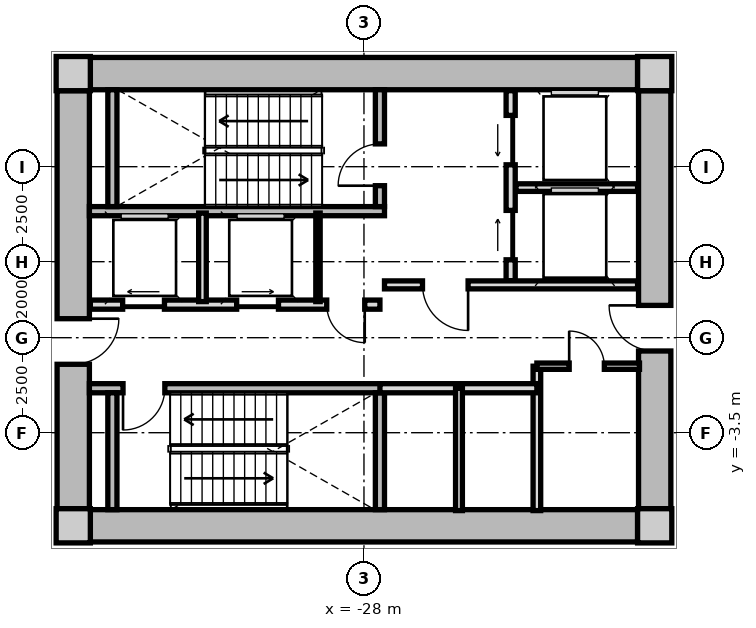
"""IFC4 building model, lengths in metres.
Left out: names, types, materials, properties, quantities, classifications, styles, units other than length and angle.
Written with IfcOpenShell. Run it as: python <this file> out.ifc"""

import sys

from ifc_helpers import new_model, si_unit, direction, frame, frame_2d, origin, origin_2d, place, context, subcontext, project, spatial, rectangle, extrude, source, transform, mapped, element, fill, save


model = new_model("IFC4")
c1 = context("Model", 3, precision=1e-05, world=origin(), true_north=direction((0.0, 1.0)))
c2 = subcontext(c1, "Body", "Model", "MODEL_VIEW")
j1 = project(units=[si_unit("LENGTHUNIT", "METRE"), si_unit("PLANEANGLEUNIT", "RADIAN")], contexts=[c1])
p1 = place(None, origin())
s1 = spatial("IfcSite", under=j1, at=p1, CompositionType="ELEMENT")
p2 = place(p1, origin())
s2 = spatial("IfcBuilding", under=s1, at=p2, CompositionType="ELEMENT")
p3 = place(p2, frame((0.0, 0.0, 4.2)))
s3 = spatial("IfcBuildingStorey", under=s2, at=p3, CompositionType="ELEMENT", Elevation=4.2)
m1 = source(origin(), c2, "Body", "SweptSolid", [
    extrude(rectangle(XDim=0.9, YDim=0.9, at=origin_2d()), origin(), (0.0, 0.0, 1.0), 4.2),
])
for number, where, z_axis, x_axis in (
    (1, (-35.65, -5.95, 0.0), (0.0, 0.0, 1.0), (1.0, 0.0, 0.0)),
    (2, (-20.35, -5.95, 0.0), (0.0, 0.0, 1.0), (1.0, 0.0, 0.0)),
    (3, (-20.35, 5.95, 0.0), (0.0, 0.0, 1.0), (1.0, 0.0, 0.0)),
    (4, (-35.65, 5.95, 0.0), (0.0, 0.0, 1.0), (1.0, 0.0, 0.0)),
):
    element("IfcColumn", number, at=place(p3, frame(where, z_axis=z_axis, x_axis=x_axis)), inside=s3, PredefinedType="COLUMN", context=c2, shape_type="MappedRepresentation", body=[
        mapped(m1, transform((0.0, 0.0, 0.0), x_axis=(1.0, 0.0, 0.0), y_axis=(0.0, 1.0, 0.0), z_axis=(0.0, 0.0, 1.0), scale=1.0)),
    ])
m2 = source(origin(), c2, "Body", "SweptSolid", [
    extrude(rectangle(XDim=14.4, YDim=0.85, at=frame_2d((7.2, 0.0))), origin(), (0.0, 0.0, 1.0), 3.88),
])
for number, where, z_axis, x_axis in (
    (5, (-35.2, 5.95, 0.0), (0.0, 0.0, 1.0), (1.0, 0.0, 0.0)),
    (6, (-20.8, -5.95, 0.0), (0.0, 0.0, 1.0), (-1.0, 0.0, 0.0)),
):
    element("IfcWall", number, at=place(p3, frame(where, z_axis=z_axis, x_axis=x_axis)), inside=s3, PredefinedType="SHEAR", context=c2, shape_type="MappedRepresentation", body=[
        mapped(m2, transform((0.0, 0.0, 0.0), x_axis=(1.0, 0.0, 0.0), y_axis=(0.0, 1.0, 0.0), z_axis=(0.0, 0.0, 1.0), scale=1.0)),
    ])
m3 = source(origin(), c2, "Body", "SweptSolid", [
    extrude(rectangle(XDim=11.0, YDim=0.85, at=frame_2d((5.5, 0.0))), origin(), (0.0, 0.0, 1.0), 3.88),
])
p4 = place(p3, frame((-35.65, -5.5, 0.0), z_axis=(0.0, 0.0, 1.0), x_axis=(0.0, 1.0, 0.0)))
e7 = element("IfcWall", 7, at=p4, inside=s3, PredefinedType="SHEAR", context=c2, shape_type="MappedRepresentation", body=[
    mapped(m3, transform((0.0, 0.0, 0.0), x_axis=(1.0, 0.0, 0.0), y_axis=(0.0, 1.0, 0.0), z_axis=(0.0, 0.0, 1.0), scale=1.0)),
])
p5 = place(p4, frame((3.8, 0.0, 0.0)))
e8 = element("IfcOpeningElement", 8, at=p5, cuts=e7, PredefinedType="OPENING", context=c2, shape_type="SweptSolid", body=[
    extrude(rectangle(XDim=1.2, YDim=2.15, at=frame_2d((0.6, 1.075))), frame((0.0, 0.435, 0.0), z_axis=(0.0, -1.0, 0.0), x_axis=(1.0, 0.0, 0.0)), (0.0, 0.0, 1.0), 0.87),
])
p6 = place(p3, frame((-20.35, 5.5, 0.0), z_axis=(0.0, 0.0, 1.0), x_axis=(0.0, -1.0, 0.0)))
e9 = element("IfcWall", 9, at=p6, inside=s3, PredefinedType="SHEAR", context=c2, shape_type="MappedRepresentation", body=[
    mapped(m3, transform((0.0, 0.0, 0.0), x_axis=(1.0, 0.0, 0.0), y_axis=(0.0, 1.0, 0.0), z_axis=(0.0, 0.0, 1.0), scale=1.0)),
])
p7 = place(p6, frame((5.65, 0.0, 0.0)))
e10 = element("IfcOpeningElement", 10, at=p7, cuts=e9, PredefinedType="OPENING", context=c2, shape_type="SweptSolid", body=[
    extrude(rectangle(XDim=1.2, YDim=2.15, at=frame_2d((0.6, 1.075))), frame((0.0, 0.435, 0.0), z_axis=(0.0, -1.0, 0.0), x_axis=(1.0, 0.0, 0.0)), (0.0, 0.0, 1.0), 0.87),
])
m4 = source(origin(), c2, "Body", "SweptSolid", [
    extrude(rectangle(XDim=7.765, YDim=0.24, at=frame_2d((3.883, 0.0))), origin(), (0.0, 0.0, 1.0), 3.88),
])
p8 = place(p3, frame((-35.225, 2.33, 0.0), z_axis=(0.0, 0.0, 1.0), x_axis=(1.0, 0.0, 0.0)))
e11 = element("IfcWall", 11, at=p8, inside=s3, PredefinedType="PARTITIONING", context=c2, shape_type="MappedRepresentation", body=[
    mapped(m4, transform((0.0, 0.0, 0.0), x_axis=(1.0, 0.0, 0.0), y_axis=(0.0, 1.0, 0.0), z_axis=(0.0, 0.0, 1.0), scale=1.0)),
])
m5 = source(origin(), c2, "Body", "SweptSolid", [
    extrude(rectangle(XDim=3.075, YDim=0.24, at=frame_2d((1.538, 0.0))), origin(), (0.0, 0.0, 1.0), 3.88),
])
p9 = place(p3, frame((-34.62, 2.45, 0.0), z_axis=(0.0, 0.0, 1.0), x_axis=(0.0, 1.0, 0.0)))
e12 = element("IfcWall", 12, at=p9, inside=s3, PredefinedType="PARTITIONING", context=c2, shape_type="MappedRepresentation", body=[
    mapped(m5, transform((0.0, 0.0, 0.0), x_axis=(1.0, 0.0, 0.0), y_axis=(0.0, 1.0, 0.0), z_axis=(0.0, 0.0, 1.0), scale=1.0)),
])
p10 = place(p3, frame((-27.58, 2.45, 0.0), z_axis=(0.0, 0.0, 1.0), x_axis=(0.0, 1.0, 0.0)))
e13 = element("IfcWall", 13, at=p10, inside=s3, PredefinedType="PARTITIONING", context=c2, shape_type="MappedRepresentation", body=[
    mapped(m5, transform((0.0, 0.0, 0.0), x_axis=(1.0, 0.0, 0.0), y_axis=(0.0, 1.0, 0.0), z_axis=(0.0, 0.0, 1.0), scale=1.0)),
])
p11 = place(p10, frame((0.55, 0.0, 0.0)))
e14 = element("IfcOpeningElement", 14, at=p11, cuts=e13, PredefinedType="OPENING", context=c2, shape_type="SweptSolid", body=[
    extrude(rectangle(XDim=1.1, YDim=2.15, at=frame_2d((0.55, 1.075))), frame((0.0, 0.13, 0.0), z_axis=(0.0, -1.0, 0.0), x_axis=(1.0, 0.0, 0.0)), (0.0, 0.0, 1.0), 0.26),
])
p12 = place(p3, frame((-35.225, -2.33, 0.0), z_axis=(0.0, 0.0, 1.0), x_axis=(1.0, 0.0, 0.0)))
e15 = element("IfcWall", 15, at=p12, inside=s3, PredefinedType="PARTITIONING", context=c2, shape_type="MappedRepresentation", body=[
    mapped(m4, transform((0.0, 0.0, 0.0), x_axis=(1.0, 0.0, 0.0), y_axis=(0.0, 1.0, 0.0), z_axis=(0.0, 0.0, 1.0), scale=1.0)),
])
p13 = place(p12, frame((0.885, 0.0, 0.0)))
e16 = element("IfcOpeningElement", 16, at=p13, cuts=e15, PredefinedType="OPENING", context=c2, shape_type="SweptSolid", body=[
    extrude(rectangle(XDim=1.1, YDim=2.15, at=frame_2d((0.55, 1.075))), frame((0.0, 0.13, 0.0), z_axis=(0.0, -1.0, 0.0), x_axis=(1.0, 0.0, 0.0)), (0.0, 0.0, 1.0), 0.26),
])
for number, where, z_axis, x_axis in (
    (17, (-34.62, -5.525, 0.0), (0.0, 0.0, 1.0), (0.0, 1.0, 0.0)),
    (18, (-27.58, -5.525, 0.0), (0.0, 0.0, 1.0), (0.0, 1.0, 0.0)),
):
    element("IfcWall", number, at=place(p3, frame(where, z_axis=z_axis, x_axis=x_axis)), inside=s3, PredefinedType="PARTITIONING", context=c2, shape_type="MappedRepresentation", body=[
        mapped(m5, transform((0.0, 0.0, 0.0), x_axis=(1.0, 0.0, 0.0), y_axis=(0.0, 1.0, 0.0), z_axis=(0.0, 0.0, 1.0), scale=1.0)),
    ])
m6 = source(origin(), c2, "Body", "SweptSolid", [
    extrude(rectangle(XDim=5.0, YDim=0.24, at=frame_2d((2.5, 0.0))), origin(), (0.0, 0.0, 1.0), 3.865),
])
p14 = place(p3, frame((-24.14, 0.5, 0.0), z_axis=(0.0, 0.0, 1.0), x_axis=(0.0, 1.0, 0.0)))
e19 = element("IfcWall", 19, at=p14, inside=s3, PredefinedType="PARTITIONING", context=c2, shape_type="MappedRepresentation", body=[
    mapped(m6, transform((0.0, 0.0, 0.0), x_axis=(1.0, 0.0, 0.0), y_axis=(0.0, 1.0, 0.0), z_axis=(0.0, 0.0, 1.0), scale=1.0)),
])
p15 = place(p14, frame((3.05, 0.0, 0.0)))
e20 = element("IfcOpeningElement", 20, at=p15, cuts=e19, PredefinedType="OPENING", context=c2, shape_type="SweptSolid", body=[
    extrude(rectangle(XDim=1.3, YDim=2.2, at=frame_2d((0.65, 1.1))), frame((0.0, 0.13, 0.0), z_axis=(0.0, -1.0, 0.0), x_axis=(1.0, 0.0, 0.0)), (0.0, 0.0, 1.0), 0.26),
])
p16 = place(p14, frame((0.55, 0.0, 0.0)))
e21 = element("IfcOpeningElement", 21, at=p16, cuts=e19, PredefinedType="OPENING", context=c2, shape_type="SweptSolid", body=[
    extrude(rectangle(XDim=1.3, YDim=2.2, at=frame_2d((0.65, 1.1))), frame((0.0, 0.13, 0.0), z_axis=(0.0, -1.0, 0.0), x_axis=(1.0, 0.0, 0.0)), (0.0, 0.0, 1.0), 0.26),
])
m7 = source(origin(), c2, "Body", "SweptSolid", [
    extrude(rectangle(XDim=3.2, YDim=0.2, at=frame_2d((1.6, 0.0))), origin(), (0.0, 0.0, 1.0), 3.865),
])
p17 = place(p3, frame((-24.0, 2.95, 0.0), z_axis=(0.0, 0.0, 1.0), x_axis=(1.0, 0.0, 0.0)))
e22 = element("IfcWall", 22, at=p17, inside=s3, PredefinedType="PARTITIONING", context=c2, shape_type="MappedRepresentation", body=[
    mapped(m7, transform((0.0, 0.0, 0.0), x_axis=(1.0, 0.0, 0.0), y_axis=(0.0, 1.0, 0.0), z_axis=(0.0, 0.0, 1.0), scale=1.0)),
])
m8 = source(origin(), c2, "Body", "SweptSolid", [
    extrude(rectangle(XDim=6.66, YDim=0.21, at=frame_2d((3.33, 0.0))), origin(), (0.0, 0.0, 1.0), 3.865),
])
p18 = place(p3, frame((-27.46, 0.39, 0.0), z_axis=(0.0, 0.0, 1.0), x_axis=(1.0, 0.0, 0.0)))
e23 = element("IfcWall", 23, at=p18, inside=s3, PredefinedType="PARTITIONING", context=c2, shape_type="MappedRepresentation", body=[
    mapped(m8, transform((0.0, 0.0, 0.0), x_axis=(1.0, 0.0, 0.0), y_axis=(0.0, 1.0, 0.0), z_axis=(0.0, 0.0, 1.0), scale=1.0)),
])
p19 = place(p18, frame((1.0, 0.0, 0.0)))
e24 = element("IfcOpeningElement", 24, at=p19, cuts=e23, PredefinedType="OPENING", context=c2, shape_type="SweptSolid", body=[
    extrude(rectangle(XDim=1.2, YDim=2.15, at=frame_2d((0.6, 1.075))), frame((0.0, 0.115, 0.0), z_axis=(0.0, -1.0, 0.0), x_axis=(1.0, 0.0, 0.0)), (0.0, 0.0, 1.0), 0.23),
])
m9 = source(origin(), c2, "Body", "SweptSolid", [
    extrude(rectangle(XDim=7.62, YDim=0.24, at=frame_2d((3.81, 0.0))), origin(), (0.0, 0.0, 1.0), 3.865),
])
p20 = place(p3, frame((-35.2, -0.13, 0.0), z_axis=(0.0, 0.0, 1.0), x_axis=(1.0, 0.0, 0.0)))
e25 = element("IfcWall", 25, at=p20, inside=s3, PredefinedType="PARTITIONING", context=c2, shape_type="MappedRepresentation", body=[
    mapped(m9, transform((0.0, 0.0, 0.0), x_axis=(1.0, 0.0, 0.0), y_axis=(0.0, 1.0, 0.0), z_axis=(0.0, 0.0, 1.0), scale=1.0)),
])
p21 = place(p20, frame((6.22, 0.0, 0.0)))
e26 = element("IfcOpeningElement", 26, at=p21, cuts=e25, PredefinedType="OPENING", context=c2, shape_type="SweptSolid", body=[
    extrude(rectangle(XDim=1.0, YDim=2.1, at=frame_2d((0.5, 1.05))), frame((0.0, 0.13, 0.0), z_axis=(0.0, -1.0, 0.0), x_axis=(1.0, 0.0, 0.0)), (0.0, 0.0, 1.0), 0.26),
])
p22 = place(p20, frame((0.85, 0.0, 0.0)))
e27 = element("IfcOpeningElement", 27, at=p22, cuts=e25, PredefinedType="OPENING", context=c2, shape_type="SweptSolid", body=[
    extrude(rectangle(XDim=1.1, YDim=2.2, at=frame_2d((0.55, 1.1))), frame((0.0, 0.13, 0.0), z_axis=(0.0, -1.0, 0.0), x_axis=(1.0, 0.0, 0.0)), (0.0, 0.0, 1.0), 0.26),
])
p23 = place(p20, frame((3.85, 0.0, 0.0)))
e28 = element("IfcOpeningElement", 28, at=p23, cuts=e25, PredefinedType="OPENING", context=c2, shape_type="SweptSolid", body=[
    extrude(rectangle(XDim=1.1, YDim=2.2, at=frame_2d((0.55, 1.1))), frame((0.0, 0.13, 0.0), z_axis=(0.0, -1.0, 0.0), x_axis=(1.0, 0.0, 0.0)), (0.0, 0.0, 1.0), 0.26),
])
m10 = source(origin(), c2, "Body", "SweptSolid", [
    extrude(rectangle(XDim=2.33, YDim=0.115, at=frame_2d((1.165, 0.0))), origin(), (0.0, 0.0, 1.0), 3.865),
])
p24 = place(p3, frame((-29.21, -0.05, 0.0), z_axis=(0.0, 0.0, 1.0), x_axis=(0.0, 1.0, 0.0)))
e29 = element("IfcWall", 29, at=p24, inside=s3, PredefinedType="PARTITIONING", context=c2, shape_type="MappedRepresentation", body=[
    mapped(m10, transform((0.0, 0.0, 0.0), x_axis=(1.0, 0.0, 0.0), y_axis=(0.0, 1.0, 0.0), z_axis=(0.0, 0.0, 1.0), scale=1.0)),
])
m11 = source(origin(), c2, "Body", "SweptSolid", [
    extrude(rectangle(XDim=2.33, YDim=0.2, at=frame_2d((1.165, 0.0))), origin(), (0.0, 0.0, 1.0), 3.865),
])
p25 = place(p3, frame((-32.25, -0.05, 0.0), z_axis=(0.0, 0.0, 1.0), x_axis=(0.0, 1.0, 0.0)))
e30 = element("IfcWall", 30, at=p25, inside=s3, PredefinedType="PARTITIONING", context=c2, shape_type="MappedRepresentation", body=[
    mapped(m11, transform((0.0, 0.0, 0.0), x_axis=(1.0, 0.0, 0.0), y_axis=(0.0, 1.0, 0.0), z_axis=(0.0, 0.0, 1.0), scale=1.0)),
])
m12 = source(origin(), c2, "Body", "SweptSolid", [
    extrude(rectangle(XDim=3.8, YDim=0.2, at=frame_2d((1.9, 0.0))), origin(), (0.0, 0.0, 1.0), 3.865),
])
p26 = place(p3, frame((-23.45, -5.55, 0.0), z_axis=(0.0, 0.0, 1.0), x_axis=(0.0, 1.0, 0.0)))
e31 = element("IfcWall", 31, at=p26, inside=s3, PredefinedType="PARTITIONING", context=c2, shape_type="MappedRepresentation", body=[
    mapped(m12, transform((0.0, 0.0, 0.0), x_axis=(1.0, 0.0, 0.0), y_axis=(0.0, 1.0, 0.0), z_axis=(0.0, 0.0, 1.0), scale=1.0)),
])
m13 = source(origin(), c2, "Body", "SweptSolid", [
    extrude(rectangle(XDim=4.13, YDim=0.24, at=frame_2d((2.065, 0.0))), origin(), (0.0, 0.0, 1.0), 3.865),
])
p27 = place(p3, frame((-27.58, -2.33, 0.0), z_axis=(0.0, 0.0, 1.0), x_axis=(1.0, 0.0, 0.0)))
e32 = element("IfcWall", 32, at=p27, inside=s3, PredefinedType="PARTITIONING", context=c2, shape_type="MappedRepresentation", body=[
    mapped(m13, transform((0.0, 0.0, 0.0), x_axis=(1.0, 0.0, 0.0), y_axis=(0.0, 1.0, 0.0), z_axis=(0.0, 0.0, 1.0), scale=1.0)),
])
m14 = source(origin(), c2, "Body", "SweptSolid", [
    extrude(rectangle(XDim=3.22, YDim=0.18, at=frame_2d((1.61, 0.0))), origin(), (0.0, 0.0, 1.0), 3.865),
])
p28 = place(p3, frame((-25.5, -5.55, 0.0), z_axis=(0.0, 0.0, 1.0), x_axis=(0.0, 1.0, 0.0)))
e33 = element("IfcWall", 33, at=p28, inside=s3, PredefinedType="PARTITIONING", context=c2, shape_type="MappedRepresentation", body=[
    mapped(m14, transform((0.0, 0.0, 0.0), x_axis=(1.0, 0.0, 0.0), y_axis=(0.0, 1.0, 0.0), z_axis=(0.0, 0.0, 1.0), scale=1.0)),
])
m15 = source(origin(), c2, "Body", "SweptSolid", [
    extrude(rectangle(XDim=2.7, YDim=0.165, at=frame_2d((1.35, 0.0))), origin(), (0.0, 0.0, 1.0), 3.865),
])
p29 = place(p3, frame((-23.45, -1.75, 0.0), z_axis=(0.0, 0.0, 1.0), x_axis=(1.0, 0.0, 0.0)))
e34 = element("IfcWall", 34, at=p29, inside=s3, PredefinedType="PARTITIONING", context=c2, shape_type="MappedRepresentation", body=[
    mapped(m15, transform((0.0, 0.0, 0.0), x_axis=(1.0, 0.0, 0.0), y_axis=(0.0, 1.0, 0.0), z_axis=(0.0, 0.0, 1.0), scale=1.0)),
])
p30 = place(p29, frame((0.85, 0.0, 0.0)))
e35 = element("IfcOpeningElement", 35, at=p30, cuts=e34, PredefinedType="OPENING", context=c2, shape_type="SweptSolid", body=[
    extrude(rectangle(XDim=0.925, YDim=2.1, at=frame_2d((0.462, 1.05))), frame((0.0, 0.093, 0.0), z_axis=(0.0, -1.0, 0.0), x_axis=(1.0, 0.0, 0.0)), (0.0, 0.0, 1.0), 0.185),
])
m16 = source(origin(), c2, "Body", "SweptSolid", [
    extrude(rectangle(XDim=1.1, YDim=2.15, at=frame_2d((0.55, 1.075))), frame((0.0, 0.025, 0.0), z_axis=(0.0, -1.0, 0.0), x_axis=(1.0, 0.0, 0.0)), (0.0, 0.0, 1.0), 0.05),
])
p31 = place(p11, origin())
e36 = element("IfcDoor", 36, at=p31, inside=s3, OperationType="SINGLE_SWING_LEFT", PredefinedType="DOOR", context=c2, shape_type="MappedRepresentation", body=[
    mapped(m16, transform((0.0, 0.0, 0.0), x_axis=(1.0, 0.0, 0.0), y_axis=(0.0, 1.0, 0.0), z_axis=(0.0, 0.0, 1.0), scale=1.0)),
])
fill(e14, e36)
p32 = place(p13, frame((1.1, 0.0, 0.0), z_axis=(0.0, 0.0, 1.0), x_axis=(-1.0, 0.0, 0.0)))
e37 = element("IfcDoor", 37, at=p32, inside=s3, OperationType="SINGLE_SWING_RIGHT", PredefinedType="DOOR", context=c2, shape_type="MappedRepresentation", body=[
    mapped(m16, transform((0.0, 0.0, 0.0), x_axis=(1.0, 0.0, 0.0), y_axis=(0.0, 1.0, 0.0), z_axis=(0.0, 0.0, 1.0), scale=1.0)),
])
fill(e16, e37)
m17 = source(origin(), c2, "Body", "SweptSolid", [
    extrude(rectangle(XDim=1.3, YDim=2.2, at=frame_2d((0.65, 1.1))), frame((0.0, 0.025, 0.0), z_axis=(0.0, -1.0, 0.0), x_axis=(1.0, 0.0, 0.0)), (0.0, 0.0, 1.0), 0.05),
])
p33 = place(p15, origin())
e38 = element("IfcDoor", 38, at=p33, inside=s3, OperationType="SLIDING_TO_LEFT", PredefinedType="DOOR", context=c2, shape_type="MappedRepresentation", body=[
    mapped(m17, transform((0.0, 0.0, 0.0), x_axis=(1.0, 0.0, 0.0), y_axis=(0.0, 1.0, 0.0), z_axis=(0.0, 0.0, 1.0), scale=1.0)),
])
fill(e20, e38)
p34 = place(p16, origin())
e39 = element("IfcDoor", 39, at=p34, inside=s3, OperationType="SLIDING_TO_RIGHT", PredefinedType="DOOR", context=c2, shape_type="MappedRepresentation", body=[
    mapped(m17, transform((0.0, 0.0, 0.0), x_axis=(1.0, 0.0, 0.0), y_axis=(0.0, 1.0, 0.0), z_axis=(0.0, 0.0, 1.0), scale=1.0)),
])
fill(e21, e39)
m18 = source(origin(), c2, "Body", "SweptSolid", [
    extrude(rectangle(XDim=1.2, YDim=2.15, at=frame_2d((0.6, 1.075))), frame((0.0, 0.025, 0.0), z_axis=(0.0, -1.0, 0.0), x_axis=(1.0, 0.0, 0.0)), (0.0, 0.0, 1.0), 0.05),
])
p35 = place(p19, frame((1.2, 0.0, 0.0), z_axis=(0.0, 0.0, 1.0), x_axis=(-1.0, 0.0, 0.0)))
e40 = element("IfcDoor", 40, at=p35, inside=s3, OperationType="SINGLE_SWING_LEFT", PredefinedType="DOOR", context=c2, shape_type="MappedRepresentation", body=[
    mapped(m18, transform((0.0, 0.0, 0.0), x_axis=(1.0, 0.0, 0.0), y_axis=(0.0, 1.0, 0.0), z_axis=(0.0, 0.0, 1.0), scale=1.0)),
])
fill(e24, e40)
p36 = place(p5, frame((1.2, 0.0, 0.0), z_axis=(0.0, 0.0, 1.0), x_axis=(-1.0, 0.0, 0.0)))
e41 = element("IfcDoor", 41, at=p36, inside=s3, OperationType="SINGLE_SWING_LEFT", PredefinedType="DOOR", context=c2, shape_type="MappedRepresentation", body=[
    mapped(m18, transform((0.0, 0.0, 0.0), x_axis=(1.0, 0.0, 0.0), y_axis=(0.0, 1.0, 0.0), z_axis=(0.0, 0.0, 1.0), scale=1.0)),
])
fill(e8, e41)
p37 = place(p7, frame((1.2, 0.0, 0.0), z_axis=(0.0, 0.0, 1.0), x_axis=(-1.0, 0.0, 0.0)))
e42 = element("IfcDoor", 42, at=p37, inside=s3, OperationType="SINGLE_SWING_RIGHT", PredefinedType="DOOR", context=c2, shape_type="MappedRepresentation", body=[
    mapped(m18, transform((0.0, 0.0, 0.0), x_axis=(1.0, 0.0, 0.0), y_axis=(0.0, 1.0, 0.0), z_axis=(0.0, 0.0, 1.0), scale=1.0)),
])
fill(e10, e42)
m19 = source(origin(), c2, "Body", "SweptSolid", [
    extrude(rectangle(XDim=1.0, YDim=2.1, at=frame_2d((0.5, 1.05))), frame((0.0, 0.025, 0.0), z_axis=(0.0, -1.0, 0.0), x_axis=(1.0, 0.0, 0.0)), (0.0, 0.0, 1.0), 0.05),
])
p38 = place(p21, frame((1.0, 0.0, 0.0), z_axis=(0.0, 0.0, 1.0), x_axis=(-1.0, 0.0, 0.0)))
e43 = element("IfcDoor", 43, at=p38, inside=s3, OperationType="SINGLE_SWING_LEFT", PredefinedType="DOOR", context=c2, shape_type="MappedRepresentation", body=[
    mapped(m19, transform((0.0, 0.0, 0.0), x_axis=(1.0, 0.0, 0.0), y_axis=(0.0, 1.0, 0.0), z_axis=(0.0, 0.0, 1.0), scale=1.0)),
])
fill(e26, e43)
m20 = source(origin(), c2, "Body", "SweptSolid", [
    extrude(rectangle(XDim=1.1, YDim=2.2, at=frame_2d((0.55, 1.1))), frame((0.0, 0.025, 0.0), z_axis=(0.0, -1.0, 0.0), x_axis=(1.0, 0.0, 0.0)), (0.0, 0.0, 1.0), 0.05),
])
p39 = place(p22, origin())
e44 = element("IfcDoor", 44, at=p39, inside=s3, OperationType="SLIDING_TO_LEFT", PredefinedType="DOOR", context=c2, shape_type="MappedRepresentation", body=[
    mapped(m20, transform((0.0, 0.0, 0.0), x_axis=(1.0, 0.0, 0.0), y_axis=(0.0, 1.0, 0.0), z_axis=(0.0, 0.0, 1.0), scale=1.0)),
])
fill(e27, e44)
p40 = place(p23, origin())
e45 = element("IfcDoor", 45, at=p40, inside=s3, OperationType="SLIDING_TO_RIGHT", PredefinedType="DOOR", context=c2, shape_type="MappedRepresentation", body=[
    mapped(m20, transform((0.0, 0.0, 0.0), x_axis=(1.0, 0.0, 0.0), y_axis=(0.0, 1.0, 0.0), z_axis=(0.0, 0.0, 1.0), scale=1.0)),
])
fill(e28, e45)
m21 = source(origin(), c2, "Body", "SweptSolid", [
    extrude(rectangle(XDim=0.925, YDim=2.1, at=frame_2d((0.462, 1.05))), frame((0.0, 0.025, 0.0), z_axis=(0.0, -1.0, 0.0), x_axis=(1.0, 0.0, 0.0)), (0.0, 0.0, 1.0), 0.05),
])
p41 = place(p30, origin())
e46 = element("IfcDoor", 46, at=p41, inside=s3, OperationType="SINGLE_SWING_LEFT", PredefinedType="DOOR", context=c2, shape_type="MappedRepresentation", body=[
    mapped(m21, transform((0.0, 0.0, 0.0), x_axis=(1.0, 0.0, 0.0), y_axis=(0.0, 1.0, 0.0), z_axis=(0.0, 0.0, 1.0), scale=1.0)),
])
fill(e35, e46)
save(model, sys.argv[1])
